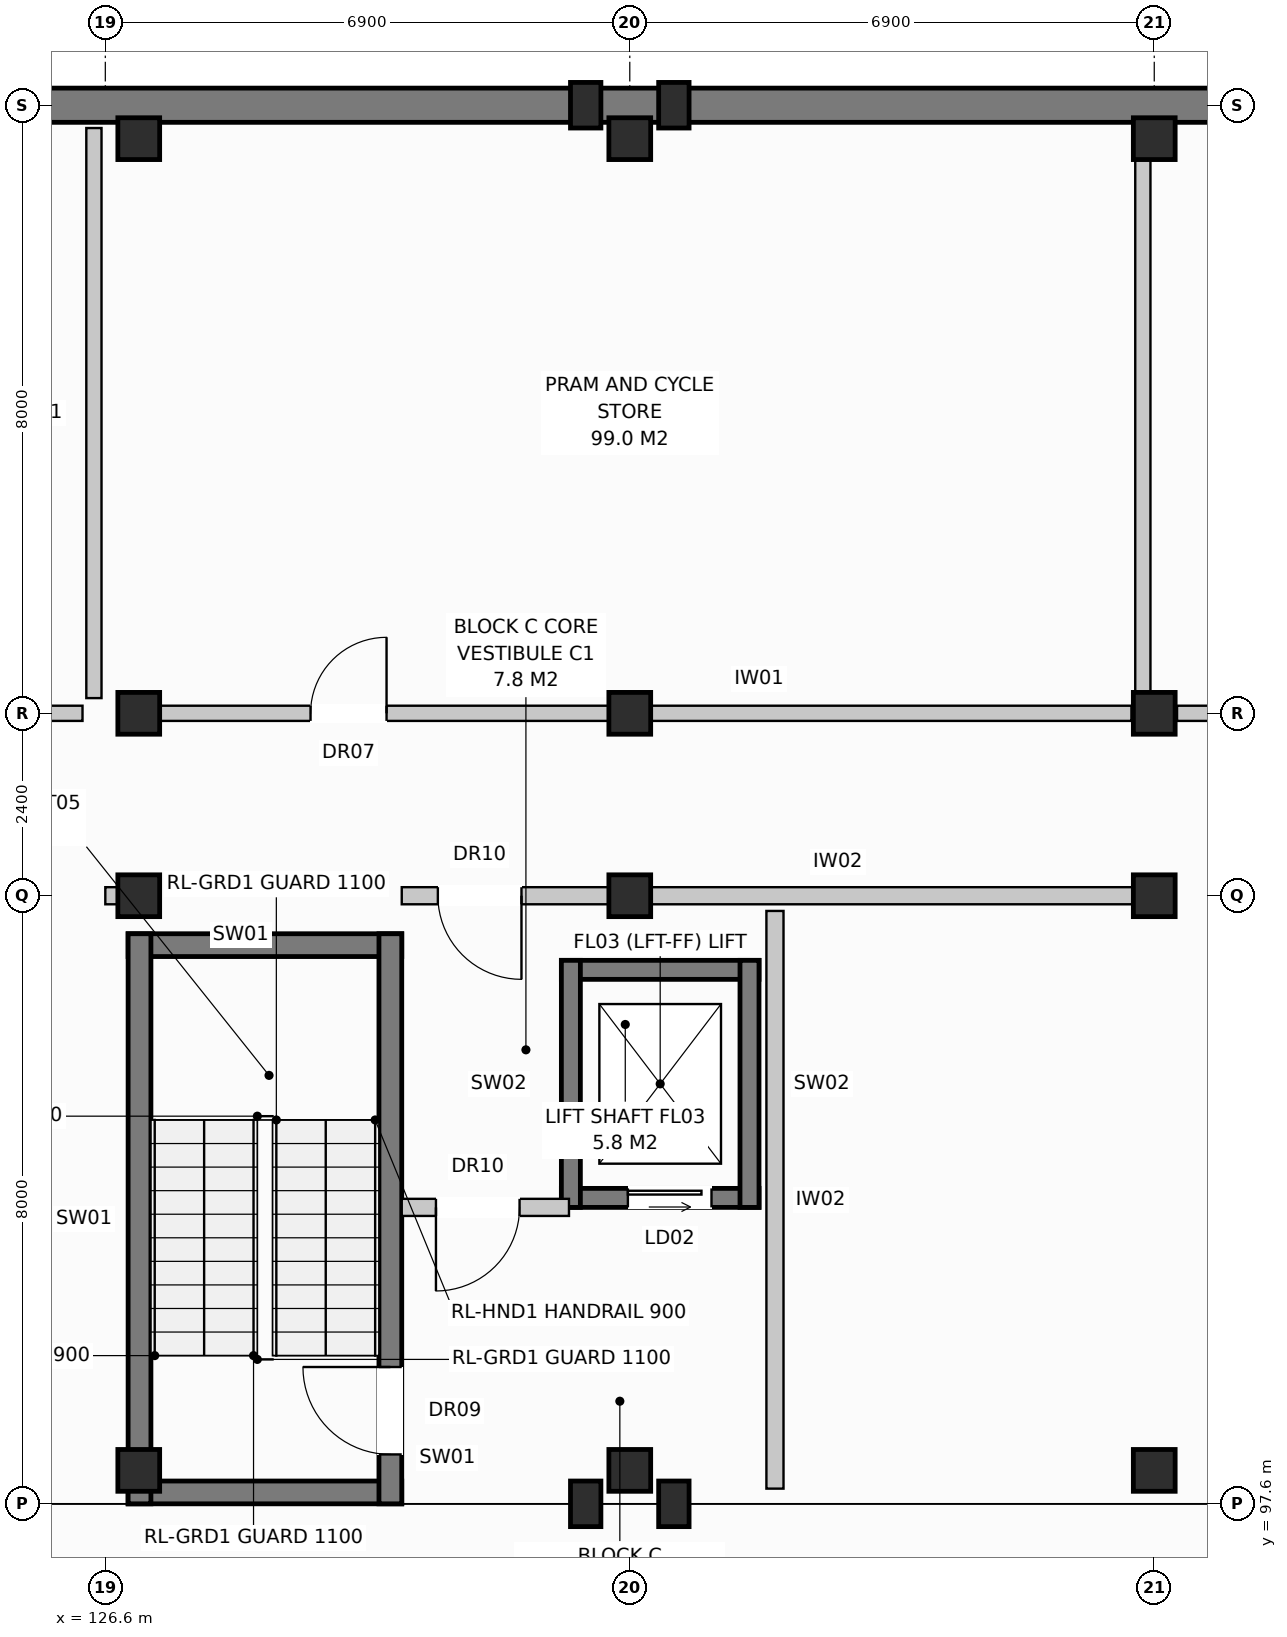
"""IFC4 building model, lengths in metres.
Left out: names, types, materials, properties, quantities, classifications, styles, units other than length and angle.
Written with IfcOpenShell. Run it as: python <this file> out.ifc"""

import sys

from ifc_helpers import new_model, si_unit, direction, frame, frame_2d, origin, origin_with_axes, origin_2d, place, context, subcontext, project, spatial, rectangle, extrude, element, fill, save


model = new_model("IFC4")
c1 = context("Model", 3, precision=1e-05, world=origin(), true_north=direction((0.0, 1.0)))
c2 = subcontext(c1, "Body", "Model", "MODEL_VIEW")
j1 = project(units=[si_unit("LENGTHUNIT", "METRE"), si_unit("PLANEANGLEUNIT", "RADIAN")], contexts=[c1])
p1 = place(None, origin())
s1 = spatial("IfcSite", under=j1, at=p1, CompositionType="ELEMENT")
p2 = place(p1, origin())
s2 = spatial("IfcBuilding", under=s1, at=p2, CompositionType="ELEMENT")
p3 = place(p2, frame((0.0, 0.0, -3.8)))
s3 = spatial("IfcBuildingStorey", under=s2, at=p3, CompositionType="ELEMENT", Elevation=-3.8)
for number, where, z_axis, x_axis in (
    (1, (127.04, 98.04, 0.0), (0.0, 0.0, 1.0), (1.0, 0.0, 0.0)),
    (2, (127.04, 105.6, 0.0), (0.0, 0.0, 1.0), (1.0, 0.0, 0.0)),
    (3, (127.04, 108.0, 0.0), (0.0, 0.0, 1.0), (1.0, 0.0, 0.0)),
    (4, (127.04, 115.56, 0.0), (0.0, 0.0, 1.0), (1.0, 0.0, 0.0)),
    (5, (133.5, 98.04, 0.0), (0.0, 0.0, 1.0), (1.0, 0.0, 0.0)),
    (6, (133.5, 105.6, 0.0), (0.0, 0.0, 1.0), (1.0, 0.0, 0.0)),
    (7, (133.5, 108.0, 0.0), (0.0, 0.0, 1.0), (1.0, 0.0, 0.0)),
    (8, (133.5, 115.56, 0.0), (0.0, 0.0, 1.0), (1.0, 0.0, 0.0)),
    (9, (140.4, 98.04, 0.0), (0.0, 0.0, 1.0), (1.0, 0.0, 0.0)),
    (10, (140.4, 105.6, 0.0), (0.0, 0.0, 1.0), (1.0, 0.0, 0.0)),
    (11, (140.4, 108.0, 0.0), (0.0, 0.0, 1.0), (1.0, 0.0, 0.0)),
    (12, (140.4, 115.56, 0.0), (0.0, 0.0, 1.0), (1.0, 0.0, 0.0)),
):
    element("IfcColumn", number, at=place(p3, frame(where, z_axis=z_axis, x_axis=x_axis)), inside=s3, PredefinedType="COLUMN", context=c2, shape_type="SweptSolid", body=[
        extrude(rectangle(XDim=0.55, YDim=0.55, at=origin_2d()), origin(), (0.0, 0.0, 1.0), 3.8),
    ])
for number, where, z_axis, x_axis in (
    (13, (132.92, 116.0, 0.0), (0.0, 0.0, 1.0), (1.0, 0.0, 0.0)),
    (14, (132.92, 97.6, 0.0), (0.0, 0.0, 1.0), (1.0, 0.0, 0.0)),
    (15, (134.08, 116.0, 0.0), (0.0, 0.0, 1.0), (1.0, 0.0, 0.0)),
    (16, (134.08, 97.6, 0.0), (0.0, 0.0, 1.0), (1.0, 0.0, 0.0)),
):
    element("IfcColumn", number, at=place(p3, frame(where, z_axis=z_axis, x_axis=x_axis)), inside=s3, PredefinedType="PILASTER", context=c2, shape_type="SweptSolid", body=[
        extrude(rectangle(XDim=0.4, YDim=0.6, at=origin_2d()), origin(), (0.0, 0.0, 1.0), 3.8),
    ])
p4 = place(p3, frame((168.0, 116.0, 0.0), z_axis=(0.0, 0.0, 1.0), x_axis=(-1.0, 0.0, 0.0)))
e17 = element("IfcWall", 17, at=p4, inside=s3, PredefinedType="STANDARD", context=c2, shape_type="SweptSolid", body=[
    extrude(rectangle(XDim=168.0, YDim=0.45, at=frame_2d((84.0, 0.0))), origin(), (0.0, 0.0, 1.0), 3.48),
])
for number, where, z_axis, x_axis in (
    (18, (126.9, 97.75, 0.0), (0.0, 0.0, 1.0), (1.0, 0.0, 0.0)),
    (19, (126.9, 104.95, 0.0), (0.0, 0.0, 1.0), (1.0, 0.0, 0.0)),
):
    element("IfcWall", number, at=place(p3, frame(where, z_axis=z_axis, x_axis=x_axis)), inside=s3, PredefinedType="SHEAR", context=c2, shape_type="SweptSolid", body=[
        extrude(rectangle(XDim=3.6, YDim=0.3, at=frame_2d((1.8, 0.0))), origin(), (0.0, 0.0, 1.0), 3.48),
    ])
p5 = place(p3, frame((127.05, 97.6, 0.0), z_axis=(0.0, 0.0, 1.0), x_axis=(0.0, 1.0, 0.0)))
e20 = element("IfcWall", 20, at=p5, inside=s3, PredefinedType="SHEAR", context=c2, shape_type="SweptSolid", body=[
    extrude(rectangle(XDim=7.5, YDim=0.3, at=frame_2d((3.75, 0.0))), origin(), (0.0, 0.0, 1.0), 3.48),
])
p6 = place(p3, frame((130.35, 97.6, 0.0), z_axis=(0.0, 0.0, 1.0), x_axis=(0.0, 1.0, 0.0)))
e21 = element("IfcWall", 21, at=p6, inside=s3, PredefinedType="SHEAR", context=c2, shape_type="SweptSolid", body=[
    extrude(rectangle(XDim=7.5, YDim=0.3, at=frame_2d((3.75, 0.0))), origin(), (0.0, 0.0, 1.0), 3.48),
])
p7 = place(p6, frame((0.65, 0.0, 0.0)))
e22 = element("IfcOpeningElement", 22, at=p7, cuts=e21, PredefinedType="OPENING", context=c2, shape_type="SweptSolid", body=[
    extrude(rectangle(XDim=1.15, YDim=2.15, at=frame_2d((0.575, 1.075))), frame((0.0, 0.162, 0.0), z_axis=(0.0, -1.0, 0.0), x_axis=(1.0, 0.0, 0.0)), (0.0, 0.0, 1.0), 0.324),
])
p8 = place(p3, frame((132.6, 101.625, 0.0), z_axis=(0.0, 0.0, 1.0), x_axis=(1.0, 0.0, 0.0)))
e23 = element("IfcWall", 23, at=p8, inside=s3, PredefinedType="SHEAR", context=c2, shape_type="SweptSolid", body=[
    extrude(rectangle(XDim=2.6, YDim=0.25, at=frame_2d((1.3, 0.0))), origin(), (0.0, 0.0, 1.0), 3.48),
])
p9 = place(p8, frame((0.875, 0.0, 0.0)))
e24 = element("IfcOpeningElement", 24, at=p9, cuts=e23, PredefinedType="OPENING", context=c2, shape_type="SweptSolid", body=[
    extrude(rectangle(XDim=1.1, YDim=2.1, at=frame_2d((0.55, 1.05))), frame((0.0, 0.137, 0.0), z_axis=(0.0, -1.0, 0.0), x_axis=(1.0, 0.0, 0.0)), (0.0, 0.0, 1.0), 0.274),
])
p10 = place(p3, frame((132.6, 104.625, 0.0), z_axis=(0.0, 0.0, 1.0), x_axis=(1.0, 0.0, 0.0)))
e25 = element("IfcWall", 25, at=p10, inside=s3, PredefinedType="SHEAR", context=c2, shape_type="SweptSolid", body=[
    extrude(rectangle(XDim=2.6, YDim=0.25, at=frame_2d((1.3, 0.0))), origin(), (0.0, 0.0, 1.0), 3.48),
])
for number, where, z_axis, x_axis in (
    (26, (132.725, 101.5, 0.0), (0.0, 0.0, 1.0), (0.0, 1.0, 0.0)),
    (27, (135.075, 101.5, 0.0), (0.0, 0.0, 1.0), (0.0, 1.0, 0.0)),
):
    element("IfcWall", number, at=place(p3, frame(where, z_axis=z_axis, x_axis=x_axis)), inside=s3, PredefinedType="SHEAR", context=c2, shape_type="SweptSolid", body=[
        extrude(rectangle(XDim=3.25, YDim=0.25, at=frame_2d((1.625, 0.0))), origin(), (0.0, 0.0, 1.0), 3.48),
    ])
p11 = place(p3, frame((135.41, 97.8, 0.0), z_axis=(0.0, 0.0, 1.0), x_axis=(0.0, 1.0, 0.0)))
e28 = element("IfcWall", 28, at=p11, inside=s3, PredefinedType="PARTITIONING", context=c2, shape_type="SweptSolid", body=[
    extrude(rectangle(XDim=7.6, YDim=0.225, at=frame_2d((3.8, 0.0))), origin(), (0.0, 0.0, 1.0), 3.19),
])
p12 = place(p3, frame((130.5, 101.5, 0.0), z_axis=(0.0, 0.0, 1.0), x_axis=(1.0, 0.0, 0.0)))
e29 = element("IfcWall", 29, at=p12, inside=s3, PredefinedType="PARTITIONING", context=c2, shape_type="SweptSolid", body=[
    extrude(rectangle(XDim=2.2, YDim=0.225, at=frame_2d((1.1, 0.0))), origin(), (0.0, 0.0, 1.0), 3.48),
])
p13 = place(p12, frame((0.45, 0.0, 0.0)))
e30 = element("IfcOpeningElement", 30, at=p13, cuts=e29, PredefinedType="OPENING", context=c2, shape_type="SweptSolid", body=[
    extrude(rectangle(XDim=1.1, YDim=2.15, at=frame_2d((0.55, 1.075))), frame((0.0, 0.125, 0.0), z_axis=(0.0, -1.0, 0.0), x_axis=(1.0, 0.0, 0.0)), (0.0, 0.0, 1.0), 0.249),
])
p14 = place(p3, frame((126.6, 105.6, 0.0), z_axis=(0.0, 0.0, 1.0), x_axis=(1.0, 0.0, 0.0)))
e31 = element("IfcWall", 31, at=p14, inside=s3, PredefinedType="PARTITIONING", context=c2, shape_type="SweptSolid", body=[
    extrude(rectangle(XDim=0.3, YDim=0.225, at=frame_2d((0.15, 0.0))), origin(), (0.0, 0.0, 1.0), 3.48),
])
p15 = place(p3, frame((130.5, 105.6, 0.0), z_axis=(0.0, 0.0, 1.0), x_axis=(1.0, 0.0, 0.0)))
e32 = element("IfcWall", 32, at=p15, inside=s3, PredefinedType="PARTITIONING", context=c2, shape_type="SweptSolid", body=[
    extrude(rectangle(XDim=9.9, YDim=0.225, at=frame_2d((4.95, 0.0))), origin(), (0.0, 0.0, 1.0), 2.92),
])
p16 = place(p15, frame((0.475, 0.0, 0.0)))
e33 = element("IfcOpeningElement", 33, at=p16, cuts=e32, PredefinedType="OPENING", context=c2, shape_type="SweptSolid", body=[
    extrude(rectangle(XDim=1.1, YDim=2.15, at=frame_2d((0.55, 1.075))), frame((0.0, 0.125, 0.0), z_axis=(0.0, -1.0, 0.0), x_axis=(1.0, 0.0, 0.0)), (0.0, 0.0, 1.0), 0.249),
])
p17 = place(p3, frame((113.1, 108.0, 0.0), z_axis=(0.0, 0.0, 1.0), x_axis=(1.0, 0.0, 0.0)))
e34 = element("IfcWall", 34, at=p17, inside=s3, PredefinedType="PARTITIONING", context=c2, shape_type="SweptSolid", body=[
    extrude(rectangle(XDim=13.2, YDim=0.2, at=frame_2d((6.6, 0.0))), origin(), (0.0, 0.0, 1.0), 2.92),
])
p18 = place(p17, frame((2.4, 0.0, 0.0)))
e35 = element("IfcOpeningElement", 35, at=p18, cuts=e34, PredefinedType="OPENING", context=c2, shape_type="SweptSolid", body=[
    extrude(rectangle(XDim=1.0, YDim=2.15, at=frame_2d((0.5, 1.075))), frame((0.0, 0.112, 0.0), z_axis=(0.0, -1.0, 0.0), x_axis=(1.0, 0.0, 0.0)), (0.0, 0.0, 1.0), 0.224),
])
p19 = place(p3, frame((126.45, 108.2, 0.0), z_axis=(0.0, 0.0, 1.0), x_axis=(0.0, 1.0, 0.0)))
e36 = element("IfcWall", 36, at=p19, inside=s3, PredefinedType="PARTITIONING", context=c2, shape_type="SweptSolid", body=[
    extrude(rectangle(XDim=7.5, YDim=0.2, at=frame_2d((3.75, 0.0))), origin(), (0.0, 0.0, 1.0), 3.48),
])
p20 = place(p3, frame((126.9, 108.0, 0.0), z_axis=(0.0, 0.0, 1.0), x_axis=(1.0, 0.0, 0.0)))
e37 = element("IfcWall", 37, at=p20, inside=s3, PredefinedType="PARTITIONING", context=c2, shape_type="SweptSolid", body=[
    extrude(rectangle(XDim=13.2, YDim=0.2, at=frame_2d((6.6, 0.0))), origin(), (0.0, 0.0, 1.0), 2.92),
])
p21 = place(p20, frame((2.4, 0.0, 0.0)))
e38 = element("IfcOpeningElement", 38, at=p21, cuts=e37, PredefinedType="OPENING", context=c2, shape_type="SweptSolid", body=[
    extrude(rectangle(XDim=1.0, YDim=2.15, at=frame_2d((0.5, 1.075))), frame((0.0, 0.112, 0.0), z_axis=(0.0, -1.0, 0.0), x_axis=(1.0, 0.0, 0.0)), (0.0, 0.0, 1.0), 0.224),
])
p22 = place(p3, frame((140.25, 108.2, 0.0), z_axis=(0.0, 0.0, 1.0), x_axis=(0.0, 1.0, 0.0)))
e39 = element("IfcWall", 39, at=p22, inside=s3, PredefinedType="PARTITIONING", context=c2, shape_type="SweptSolid", body=[
    extrude(rectangle(XDim=7.5, YDim=0.2, at=frame_2d((3.75, 0.0))), origin(), (0.0, 0.0, 1.0), 3.48),
])
p23 = place(p3, frame((140.7, 108.0, 0.0), z_axis=(0.0, 0.0, 1.0), x_axis=(1.0, 0.0, 0.0)))
e40 = element("IfcWall", 40, at=p23, inside=s3, PredefinedType="PARTITIONING", context=c2, shape_type="SweptSolid", body=[
    extrude(rectangle(XDim=13.2, YDim=0.2, at=frame_2d((6.6, 0.0))), origin(), (0.0, 0.0, 1.0), 2.92),
])
p24 = place(p23, frame((2.4, 0.0, 0.0)))
e41 = element("IfcOpeningElement", 41, at=p24, cuts=e40, PredefinedType="OPENING", context=c2, shape_type="SweptSolid", body=[
    extrude(rectangle(XDim=1.0, YDim=2.15, at=frame_2d((0.5, 1.075))), frame((0.0, 0.112, 0.0), z_axis=(0.0, -1.0, 0.0), x_axis=(1.0, 0.0, 0.0)), (0.0, 0.0, 1.0), 0.224),
])
p25 = place(p7, origin_with_axes())
e42 = element("IfcDoor", 42, at=p25, inside=s3, OperationType="SINGLE_SWING_RIGHT", PredefinedType="DOOR", context=c2, shape_type="SweptSolid", body=[
    extrude(rectangle(XDim=1.15, YDim=2.15, at=frame_2d((0.575, 1.075))), frame((0.0, 0.025, 0.0), z_axis=(0.0, -1.0, 0.0), x_axis=(1.0, 0.0, 0.0)), (0.0, 0.0, 1.0), 0.05),
])
fill(e22, e42)
p26 = place(p9, origin_with_axes())
e43 = element("IfcDoor", 43, at=p26, inside=s3, OperationType="SLIDING_TO_LEFT", PredefinedType="DOOR", context=c2, shape_type="SweptSolid", body=[
    extrude(rectangle(XDim=1.1, YDim=2.1, at=frame_2d((0.55, 1.05))), frame((0.0, 0.025, 0.0), z_axis=(0.0, -1.0, 0.0), x_axis=(1.0, 0.0, 0.0)), (0.0, 0.0, 1.0), 0.05),
])
fill(e24, e43)
p27 = place(p13, frame((1.1, 0.0, 0.0), z_axis=(0.0, 0.0, 1.0), x_axis=(-1.0, 0.0, 0.0)))
e44 = element("IfcDoor", 44, at=p27, inside=s3, OperationType="SINGLE_SWING_LEFT", PredefinedType="DOOR", context=c2, shape_type="SweptSolid", body=[
    extrude(rectangle(XDim=1.1, YDim=2.15, at=frame_2d((0.55, 1.075))), frame((0.0, 0.025, 0.0), z_axis=(0.0, -1.0, 0.0), x_axis=(1.0, 0.0, 0.0)), (0.0, 0.0, 1.0), 0.05),
])
fill(e30, e44)
p28 = place(p16, frame((1.1, 0.0, 0.0), z_axis=(0.0, 0.0, 1.0), x_axis=(-1.0, 0.0, 0.0)))
e45 = element("IfcDoor", 45, at=p28, inside=s3, OperationType="SINGLE_SWING_RIGHT", PredefinedType="DOOR", context=c2, shape_type="SweptSolid", body=[
    extrude(rectangle(XDim=1.1, YDim=2.15, at=frame_2d((0.55, 1.075))), frame((0.0, 0.025, 0.0), z_axis=(0.0, -1.0, 0.0), x_axis=(1.0, 0.0, 0.0)), (0.0, 0.0, 1.0), 0.05),
])
fill(e33, e45)
p29 = place(p21, origin_with_axes())
e46 = element("IfcDoor", 46, at=p29, inside=s3, OperationType="SINGLE_SWING_RIGHT", PredefinedType="DOOR", context=c2, shape_type="SweptSolid", body=[
    extrude(rectangle(XDim=1.0, YDim=2.15, at=frame_2d((0.5, 1.075))), frame((0.0, 0.025, 0.0), z_axis=(0.0, -1.0, 0.0), x_axis=(1.0, 0.0, 0.0)), (0.0, 0.0, 1.0), 0.05),
])
fill(e38, e46)
save(model, sys.argv[1])
